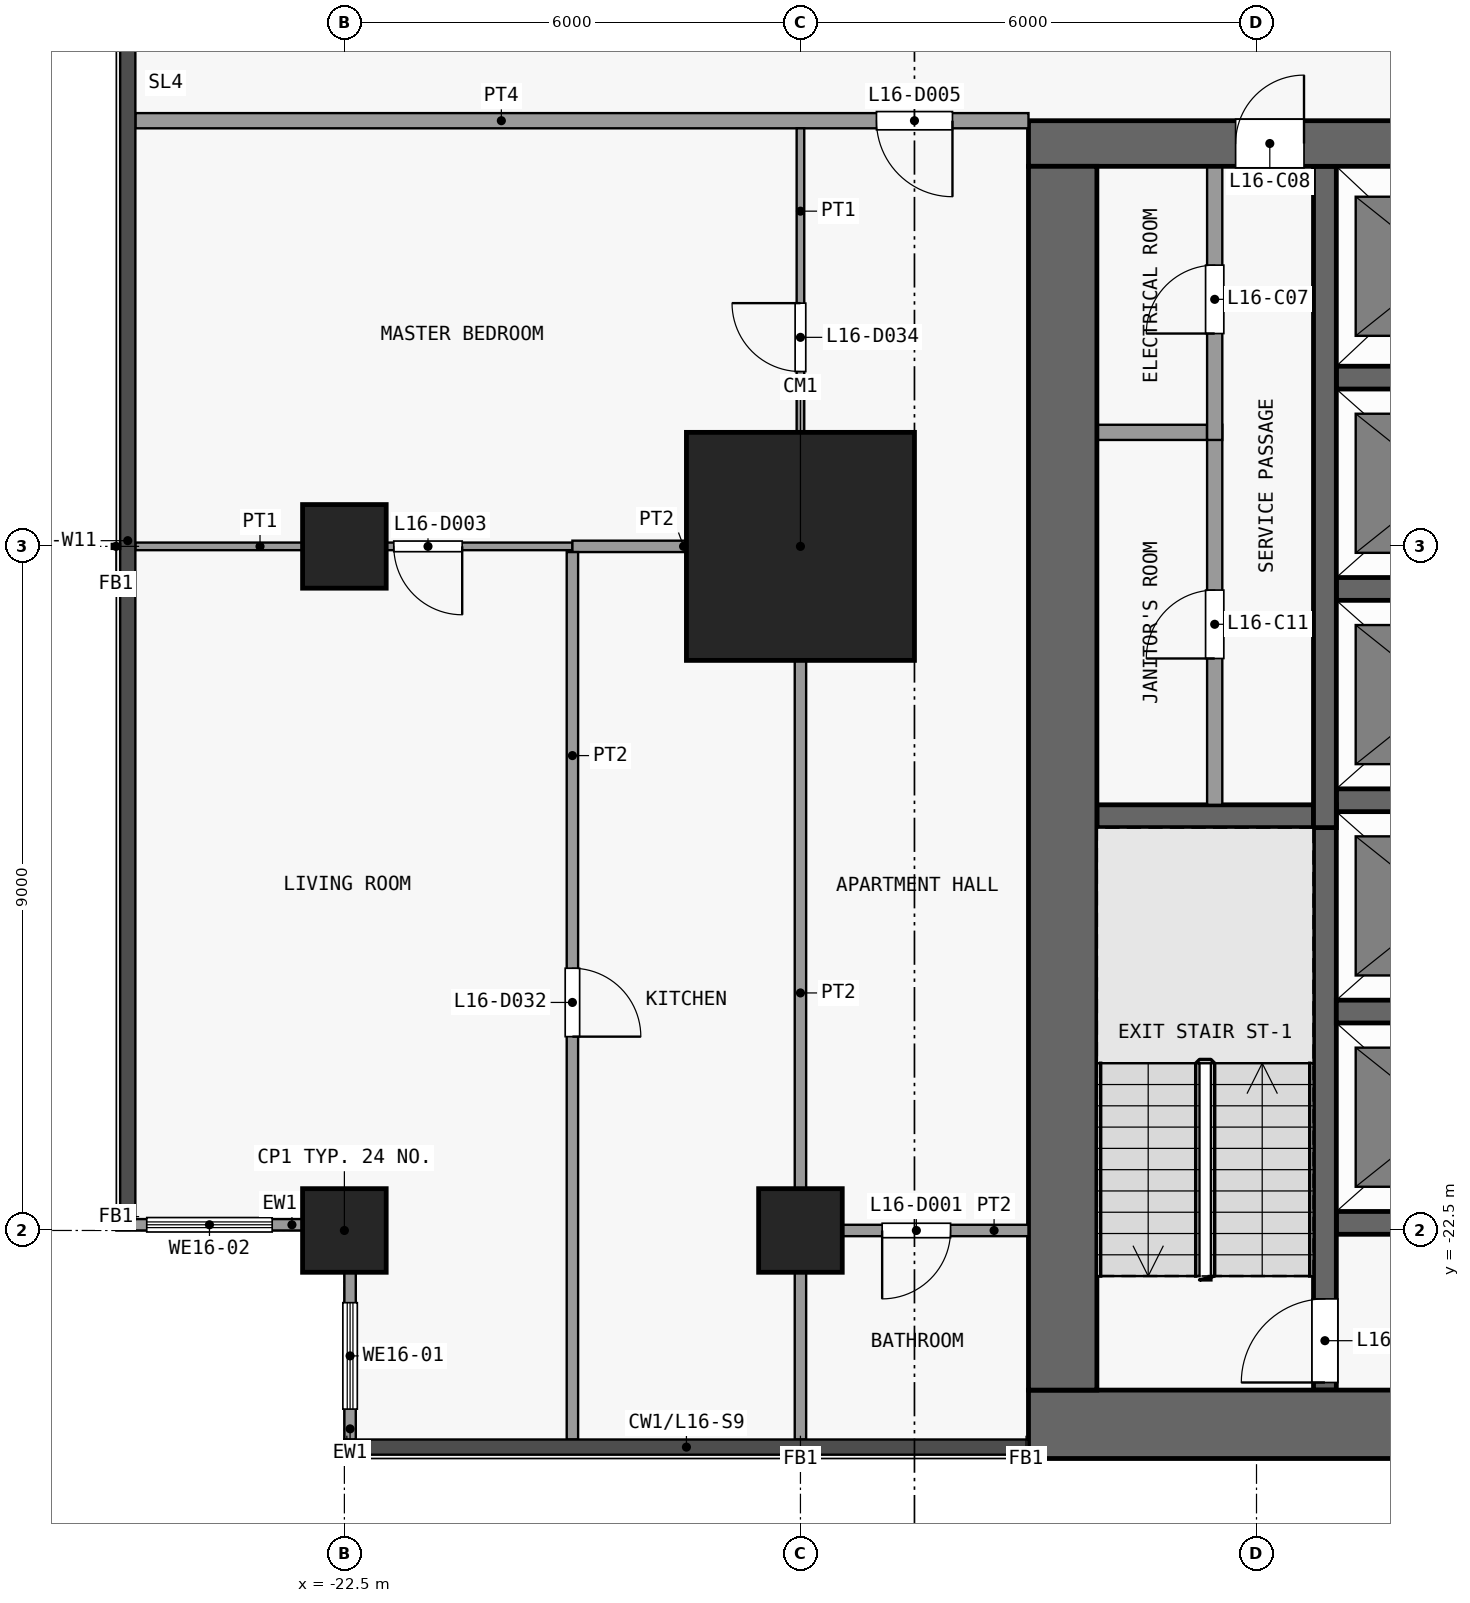
"""IFC4 building model, lengths in metres.
Left out: names, types, materials, properties, quantities, classifications, styles, units other than length and angle.
Written with IfcOpenShell. Run it as: python <this file> out.ifc"""

import sys

from ifc_helpers import new_model, si_unit, direction, frame, frame_2d, origin, origin_2d, place, context, subcontext, project, spatial, rectangle, extrude, element, fill, save


model = new_model("IFC4")
c1 = context("Model", 3, precision=1e-05, world=origin(), true_north=direction((0.0, 1.0)))
c2 = subcontext(c1, "Body", "Model", "MODEL_VIEW")
j1 = project(units=[si_unit("LENGTHUNIT", "METRE"), si_unit("PLANEANGLEUNIT", "RADIAN")], contexts=[c1])
p1 = place(None, origin())
s1 = spatial("IfcSite", under=j1, at=p1, CompositionType="ELEMENT")
p2 = place(p1, origin())
s2 = spatial("IfcBuilding", under=s1, at=p2, CompositionType="ELEMENT")
p3 = place(p2, frame((0.0, 0.0, 68.5)))
s3 = spatial("IfcBuildingStorey", under=s2, at=p3, CompositionType="ELEMENT", Elevation=68.5)
for number, where, z_axis, x_axis in (
    (1, (-22.5, -22.5, 0.0), (0.0, 0.0, 1.0), (1.0, 0.0, 0.0)),
    (2, (-22.5, -13.5, 0.0), (0.0, 0.0, 1.0), (1.0, 0.0, 0.0)),
    (3, (-16.5, -22.5, 0.0), (0.0, 0.0, 1.0), (1.0, 0.0, 0.0)),
):
    element("IfcColumn", number, at=place(p3, frame(where, z_axis=z_axis, x_axis=x_axis)), inside=s3, PredefinedType="COLUMN", context=c2, shape_type="SweptSolid", body=[
        extrude(rectangle(XDim=1.1, YDim=1.1, at=origin_2d()), origin(), (0.0, 0.0, 1.0), 3.6),
    ])
p4 = place(p3, frame((-16.5, -13.5, 0.0), z_axis=(0.0, 0.0, 1.0), x_axis=(1.0, 0.0, 0.0)))
e4 = element("IfcColumn", 4, at=p4, inside=s3, PredefinedType="COLUMN", context=c2, shape_type="SweptSolid", body=[
    extrude(rectangle(XDim=3.0, YDim=3.0, at=origin_2d()), origin(), (0.0, 0.0, 1.0), 3.6),
])
p5 = place(p3, frame((-13.5, -25.05, 0.0), z_axis=(0.0, 0.0, 1.0), x_axis=(1.0, 0.0, 0.0)))
e5 = element("IfcWall", 5, at=p5, inside=s3, PredefinedType="SHEAR", context=c2, shape_type="SweptSolid", body=[
    extrude(rectangle(XDim=27.0, YDim=0.9, at=frame_2d((13.5, 0.0))), origin(), (0.0, 0.0, 1.0), 3.3),
])
p6 = place(p3, frame((-13.5, -8.2, 0.0), z_axis=(0.0, 0.0, 1.0), x_axis=(1.0, 0.0, 0.0)))
e6 = element("IfcWall", 6, at=p6, inside=s3, PredefinedType="SHEAR", context=c2, shape_type="SweptSolid", body=[
    extrude(rectangle(XDim=27.0, YDim=0.6, at=frame_2d((13.5, 0.0))), origin(), (0.0, 0.0, 1.0), 3.3),
])
p7 = place(p6, frame((7.8, 0.0, 0.0)))
e7 = element("IfcOpeningElement", 7, at=p7, cuts=e6, PredefinedType="OPENING", context=c2, shape_type="SweptSolid", body=[
    extrude(rectangle(XDim=1.8, YDim=2.1, at=frame_2d((0.9, 1.05))), frame((0.0, 0.31, 0.0), z_axis=(0.0, -1.0, 0.0), x_axis=(1.0, 0.0, 0.0)), (0.0, 0.0, 1.0), 0.62),
])
p8 = place(p6, frame((17.4, 0.0, 0.0)))
e8 = element("IfcOpeningElement", 8, at=p8, cuts=e6, PredefinedType="OPENING", context=c2, shape_type="SweptSolid", body=[
    extrude(rectangle(XDim=1.8, YDim=2.1, at=frame_2d((0.9, 1.05))), frame((0.0, 0.31, 0.0), z_axis=(0.0, -1.0, 0.0), x_axis=(1.0, 0.0, 0.0)), (0.0, 0.0, 1.0), 0.62),
])
p9 = place(p6, frame((2.725, 0.0, 0.0)))
e9 = element("IfcOpeningElement", 9, at=p9, cuts=e6, PredefinedType="OPENING", context=c2, shape_type="SweptSolid", body=[
    extrude(rectangle(XDim=0.9, YDim=2.1, at=frame_2d((0.45, 1.05))), frame((0.0, 0.31, 0.0), z_axis=(0.0, -1.0, 0.0), x_axis=(1.0, 0.0, 0.0)), (0.0, 0.0, 1.0), 0.62),
])
p10 = place(p6, frame((24.075, 0.0, 0.0)))
e10 = element("IfcOpeningElement", 10, at=p10, cuts=e6, PredefinedType="OPENING", context=c2, shape_type="SweptSolid", body=[
    extrude(rectangle(XDim=1.2, YDim=2.1, at=frame_2d((0.6, 1.05))), frame((0.0, 0.31, 0.0), z_axis=(0.0, -1.0, 0.0), x_axis=(1.0, 0.0, 0.0)), (0.0, 0.0, 1.0), 0.62),
])
p11 = place(p3, frame((-13.05, -24.6, 0.0), z_axis=(0.0, 0.0, 1.0), x_axis=(0.0, 1.0, 0.0)))
e11 = element("IfcWall", 11, at=p11, inside=s3, PredefinedType="SHEAR", context=c2, shape_type="SweptSolid", body=[
    extrude(rectangle(XDim=16.1, YDim=0.9, at=frame_2d((8.05, 0.0))), origin(), (0.0, 0.0, 1.0), 3.3),
])
for number, where, z_axis, x_axis in (
    (12, (-9.45, -22.4, 0.0), (0.0, 0.0, 1.0), (1.0, 0.0, 0.0)),
    (13, (-9.45, -19.62, 0.0), (0.0, 0.0, 1.0), (1.0, 0.0, 0.0)),
):
    element("IfcWall", number, at=place(p3, frame(where, z_axis=z_axis, x_axis=x_axis)), inside=s3, PredefinedType="SHEAR", context=c2, shape_type="SweptSolid", body=[
        extrude(rectangle(XDim=2.8, YDim=0.3, at=frame_2d((1.4, 0.0))), origin(), (0.0, 0.0, 1.0), 3.3),
    ])
p12 = place(p3, frame((-12.6, -17.05, 0.0), z_axis=(0.0, 0.0, 1.0), x_axis=(1.0, 0.0, 0.0)))
e14 = element("IfcWall", 14, at=p12, inside=s3, PredefinedType="SHEAR", context=c2, shape_type="SweptSolid", body=[
    extrude(rectangle(XDim=2.85, YDim=0.3, at=frame_2d((1.425, 0.0))), origin(), (0.0, 0.0, 1.0), 3.3),
])
for number, where, z_axis, x_axis in (
    (15, (-9.45, -16.84, 0.0), (0.0, 0.0, 1.0), (1.0, 0.0, 0.0)),
    (16, (-9.45, -14.06, 0.0), (0.0, 0.0, 1.0), (1.0, 0.0, 0.0)),
):
    element("IfcWall", number, at=place(p3, frame(where, z_axis=z_axis, x_axis=x_axis)), inside=s3, PredefinedType="SHEAR", context=c2, shape_type="SweptSolid", body=[
        extrude(rectangle(XDim=2.8, YDim=0.3, at=frame_2d((1.4, 0.0))), origin(), (0.0, 0.0, 1.0), 3.3),
    ])
p13 = place(p3, frame((-12.6, -12.0, 0.0), z_axis=(0.0, 0.0, 1.0), x_axis=(1.0, 0.0, 0.0)))
e17 = element("IfcWall", 17, at=p13, inside=s3, PredefinedType="PARTITIONING", context=c2, shape_type="SweptSolid", body=[
    extrude(rectangle(XDim=1.45, YDim=0.2, at=frame_2d((0.725, 0.0))), origin(), (0.0, 0.0, 1.0), 3.3),
])
p14 = place(p3, frame((-9.45, -11.28, 0.0), z_axis=(0.0, 0.0, 1.0), x_axis=(1.0, 0.0, 0.0)))
e18 = element("IfcWall", 18, at=p14, inside=s3, PredefinedType="SHEAR", context=c2, shape_type="SweptSolid", body=[
    extrude(rectangle(XDim=2.8, YDim=0.3, at=frame_2d((1.4, 0.0))), origin(), (0.0, 0.0, 1.0), 3.3),
])
p15 = place(p3, frame((-11.05, -16.9, 0.0), z_axis=(0.0, 0.0, 1.0), x_axis=(0.0, 1.0, 0.0)))
e19 = element("IfcWall", 19, at=p15, inside=s3, PredefinedType="PARTITIONING", context=c2, shape_type="SweptSolid", body=[
    extrude(rectangle(XDim=5.0, YDim=0.2, at=frame_2d((2.5, 0.0))), origin(), (0.0, 0.0, 1.0), 3.3),
])
p16 = place(p15, frame((1.925, 0.0, 0.0)))
e20 = element("IfcOpeningElement", 20, at=p16, cuts=e19, PredefinedType="OPENING", context=c2, shape_type="SweptSolid", body=[
    extrude(rectangle(XDim=0.9, YDim=2.1, at=frame_2d((0.45, 1.05))), frame((0.0, 0.11, 0.0), z_axis=(0.0, -1.0, 0.0), x_axis=(1.0, 0.0, 0.0)), (0.0, 0.0, 1.0), 0.22),
])
p17 = place(p3, frame((-11.05, -12.1, 0.0), z_axis=(0.0, 0.0, 1.0), x_axis=(0.0, 1.0, 0.0)))
e21 = element("IfcWall", 21, at=p17, inside=s3, PredefinedType="PARTITIONING", context=c2, shape_type="SweptSolid", body=[
    extrude(rectangle(XDim=3.6, YDim=0.2, at=frame_2d((1.8, 0.0))), origin(), (0.0, 0.0, 1.0), 3.3),
])
p18 = place(p17, frame((1.4, 0.0, 0.0)))
e22 = element("IfcOpeningElement", 22, at=p18, cuts=e21, PredefinedType="OPENING", context=c2, shape_type="SweptSolid", body=[
    extrude(rectangle(XDim=0.9, YDim=2.1, at=frame_2d((0.45, 1.05))), frame((0.0, 0.11, 0.0), z_axis=(0.0, -1.0, 0.0), x_axis=(1.0, 0.0, 0.0)), (0.0, 0.0, 1.0), 0.22),
])
p19 = place(p3, frame((-9.6, -24.6, 0.0), z_axis=(0.0, 0.0, 1.0), x_axis=(0.0, 1.0, 0.0)))
e23 = element("IfcWall", 23, at=p19, inside=s3, PredefinedType="SHEAR", context=c2, shape_type="SweptSolid", body=[
    extrude(rectangle(XDim=7.7, YDim=0.3, at=frame_2d((3.85, 0.0))), origin(), (0.0, 0.0, 1.0), 3.3),
])
p20 = place(p19, frame((0.1, 0.0, 0.0)))
e24 = element("IfcOpeningElement", 24, at=p20, cuts=e23, PredefinedType="OPENING", context=c2, shape_type="SweptSolid", body=[
    extrude(rectangle(XDim=1.1, YDim=2.1, at=frame_2d((0.55, 1.05))), frame((0.0, 0.16, 0.0), z_axis=(0.0, -1.0, 0.0), x_axis=(1.0, 0.0, 0.0)), (0.0, 0.0, 1.0), 0.32),
])
p21 = place(p3, frame((-9.6, -17.2, 0.0), z_axis=(0.0, 0.0, 1.0), x_axis=(0.0, 1.0, 0.0)))
e25 = element("IfcWall", 25, at=p21, inside=s3, PredefinedType="SHEAR", context=c2, shape_type="SweptSolid", body=[
    extrude(rectangle(XDim=8.7, YDim=0.3, at=frame_2d((4.35, 0.0))), origin(), (0.0, 0.0, 1.0), 3.3),
])
p22 = place(p3, frame((-22.425, -25.25, 0.0), z_axis=(0.0, 0.0, 1.0), x_axis=(0.0, 1.0, 0.0)))
e26 = element("IfcWall", 26, at=p22, inside=s3, PredefinedType="SOLIDWALL", context=c2, shape_type="SweptSolid", body=[
    extrude(rectangle(XDim=2.2, YDim=0.15, at=frame_2d((1.1, 0.0))), origin(), (0.0, 0.0, 1.0), 3.3),
])
p23 = place(p22, frame((0.4, 0.0, 0.9)))
e27 = element("IfcOpeningElement", 27, at=p23, cuts=e26, PredefinedType="OPENING", context=c2, shape_type="SweptSolid", body=[
    extrude(rectangle(XDim=1.4, YDim=2.4, at=frame_2d((0.7, 1.2))), frame((0.0, 0.085, 0.0), z_axis=(0.0, -1.0, 0.0), x_axis=(1.0, 0.0, 0.0)), (0.0, 0.0, 1.0), 0.17),
])
p24 = place(p3, frame((-23.05, -22.425, 0.0), z_axis=(0.0, 0.0, 1.0), x_axis=(-1.0, 0.0, 0.0)))
e28 = element("IfcWall", 28, at=p24, inside=s3, PredefinedType="SOLIDWALL", context=c2, shape_type="SweptSolid", body=[
    extrude(rectangle(XDim=2.45, YDim=0.15, at=frame_2d((1.225, 0.0))), origin(), (0.0, 0.0, 1.0), 3.3),
])
p25 = place(p24, frame((0.4, 0.0, 0.9)))
e29 = element("IfcOpeningElement", 29, at=p25, cuts=e28, PredefinedType="OPENING", context=c2, shape_type="SweptSolid", body=[
    extrude(rectangle(XDim=1.65, YDim=2.4, at=frame_2d((0.825, 1.2))), frame((0.0, 0.085, 0.0), z_axis=(0.0, -1.0, 0.0), x_axis=(1.0, 0.0, 0.0)), (0.0, 0.0, 1.0), 0.17),
])
p26 = place(p3, frame((-16.425, -22.5, 0.0), z_axis=(0.0, 0.0, 1.0), x_axis=(1.0, 0.0, 0.0)))
e30 = element("IfcWall", 30, at=p26, inside=s3, PredefinedType="PARTITIONING", context=c2, shape_type="SweptSolid", body=[
    extrude(rectangle(XDim=2.925, YDim=0.15, at=frame_2d((1.462, 0.0))), origin(), (0.0, 0.0, 1.0), 3.3),
])
p27 = place(p26, frame((1.0, 0.0, 0.0)))
e31 = element("IfcOpeningElement", 31, at=p27, cuts=e30, PredefinedType="OPENING", context=c2, shape_type="SweptSolid", body=[
    extrude(rectangle(XDim=0.9, YDim=2.1, at=frame_2d((0.45, 1.05))), frame((0.0, 0.085, 0.0), z_axis=(0.0, -1.0, 0.0), x_axis=(1.0, 0.0, 0.0)), (0.0, 0.0, 1.0), 0.17),
])
p28 = place(p3, frame((-25.25, -13.5, 0.0), z_axis=(0.0, 0.0, 1.0), x_axis=(1.0, 0.0, 0.0)))
e32 = element("IfcWall", 32, at=p28, inside=s3, PredefinedType="PARTITIONING", context=c2, shape_type="SweptSolid", body=[
    extrude(rectangle(XDim=5.75, YDim=0.1, at=frame_2d((2.875, 0.0))), origin(), (0.0, 0.0, 1.0), 3.3),
])
p29 = place(p28, frame((3.4, 0.0, 0.0)))
e33 = element("IfcOpeningElement", 33, at=p29, cuts=e32, PredefinedType="OPENING", context=c2, shape_type="SweptSolid", body=[
    extrude(rectangle(XDim=0.9, YDim=2.1, at=frame_2d((0.45, 1.05))), frame((0.0, 0.06, 0.0), z_axis=(0.0, -1.0, 0.0), x_axis=(1.0, 0.0, 0.0)), (0.0, 0.0, 1.0), 0.12),
])
p30 = place(p3, frame((-19.5, -13.5, 0.0), z_axis=(0.0, 0.0, 1.0), x_axis=(1.0, 0.0, 0.0)))
e34 = element("IfcWall", 34, at=p30, inside=s3, PredefinedType="PARTITIONING", context=c2, shape_type="SweptSolid", body=[
    extrude(rectangle(XDim=2.925, YDim=0.15, at=frame_2d((1.462, 0.0))), origin(), (0.0, 0.0, 1.0), 3.3),
])
p31 = place(p3, frame((-25.25, -7.9, 0.0), z_axis=(0.0, 0.0, 1.0), x_axis=(1.0, 0.0, 0.0)))
e35 = element("IfcWall", 35, at=p31, inside=s3, PredefinedType="PARTITIONING", context=c2, shape_type="SweptSolid", body=[
    extrude(rectangle(XDim=11.75, YDim=0.2, at=frame_2d((5.875, 0.0))), origin(), (0.0, 0.0, 1.0), 3.3),
])
p32 = place(p31, frame((9.75, 0.0, 0.0)))
e36 = element("IfcOpeningElement", 36, at=p32, cuts=e35, PredefinedType="OPENING", context=c2, shape_type="SweptSolid", body=[
    extrude(rectangle(XDim=1.0, YDim=2.1, at=frame_2d((0.5, 1.05))), frame((0.0, 0.11, 0.0), z_axis=(0.0, -1.0, 0.0), x_axis=(1.0, 0.0, 0.0)), (0.0, 0.0, 1.0), 0.22),
])
p33 = place(p3, frame((-19.5, -25.25, 0.0), z_axis=(0.0, 0.0, 1.0), x_axis=(0.0, 1.0, 0.0)))
e37 = element("IfcWall", 37, at=p33, inside=s3, PredefinedType="PARTITIONING", context=c2, shape_type="SweptSolid", body=[
    extrude(rectangle(XDim=11.675, YDim=0.15, at=frame_2d((5.837, 0.0))), origin(), (0.0, 0.0, 1.0), 3.3),
])
p34 = place(p33, frame((5.3, 0.0, 0.0)))
e38 = element("IfcOpeningElement", 38, at=p34, cuts=e37, PredefinedType="OPENING", context=c2, shape_type="SweptSolid", body=[
    extrude(rectangle(XDim=0.9, YDim=2.1, at=frame_2d((0.45, 1.05))), frame((0.0, 0.085, 0.0), z_axis=(0.0, -1.0, 0.0), x_axis=(1.0, 0.0, 0.0)), (0.0, 0.0, 1.0), 0.17),
])
p35 = place(p3, frame((-16.5, -13.5, 0.0), z_axis=(0.0, 0.0, 1.0), x_axis=(0.0, 1.0, 0.0)))
e39 = element("IfcWall", 39, at=p35, inside=s3, PredefinedType="PARTITIONING", context=c2, shape_type="SweptSolid", body=[
    extrude(rectangle(XDim=5.5, YDim=0.1, at=frame_2d((2.75, 0.0))), origin(), (0.0, 0.0, 1.0), 3.3),
])
p36 = place(p35, frame((2.3, 0.0, 0.0)))
e40 = element("IfcOpeningElement", 40, at=p36, cuts=e39, PredefinedType="OPENING", context=c2, shape_type="SweptSolid", body=[
    extrude(rectangle(XDim=0.9, YDim=2.1, at=frame_2d((0.45, 1.05))), frame((0.0, 0.06, 0.0), z_axis=(0.0, -1.0, 0.0), x_axis=(1.0, 0.0, 0.0)), (0.0, 0.0, 1.0), 0.12),
])
p37 = place(p3, frame((-16.5, -25.25, 0.0), z_axis=(0.0, 0.0, 1.0), x_axis=(0.0, 1.0, 0.0)))
e41 = element("IfcWall", 41, at=p37, inside=s3, PredefinedType="PARTITIONING", context=c2, shape_type="SweptSolid", body=[
    extrude(rectangle(XDim=11.75, YDim=0.15, at=frame_2d((5.875, 0.0))), origin(), (0.0, 0.0, 1.0), 3.3),
])
p38 = place(p18, origin())
e42 = element("IfcDoor", 42, at=p38, inside=s3, OperationType="SINGLE_SWING_LEFT", PredefinedType="DOOR", context=c2, shape_type="SweptSolid", body=[
    extrude(rectangle(XDim=0.9, YDim=2.1, at=frame_2d((0.45, 1.05))), frame((0.0, 0.025, 0.0), z_axis=(0.0, -1.0, 0.0), x_axis=(1.0, 0.0, 0.0)), (0.0, 0.0, 1.0), 0.05),
])
fill(e22, e42)
p39 = place(p9, origin())
e43 = element("IfcDoor", 43, at=p39, inside=s3, OperationType="SINGLE_SWING_RIGHT", PredefinedType="DOOR", context=c2, shape_type="SweptSolid", body=[
    extrude(rectangle(XDim=0.9, YDim=2.1, at=frame_2d((0.45, 1.05))), frame((0.0, 0.025, 0.0), z_axis=(0.0, -1.0, 0.0), x_axis=(1.0, 0.0, 0.0)), (0.0, 0.0, 1.0), 0.05),
])
fill(e9, e43)
p40 = place(p16, origin())
e44 = element("IfcDoor", 44, at=p40, inside=s3, OperationType="SINGLE_SWING_LEFT", PredefinedType="DOOR", context=c2, shape_type="SweptSolid", body=[
    extrude(rectangle(XDim=0.9, YDim=2.1, at=frame_2d((0.45, 1.05))), frame((0.0, 0.025, 0.0), z_axis=(0.0, -1.0, 0.0), x_axis=(1.0, 0.0, 0.0)), (0.0, 0.0, 1.0), 0.05),
])
fill(e20, e44)
p41 = place(p20, origin())
e45 = element("IfcDoor", 45, at=p41, inside=s3, OperationType="SINGLE_SWING_LEFT", PredefinedType="DOOR", context=c2, shape_type="SweptSolid", body=[
    extrude(rectangle(XDim=1.1, YDim=2.1, at=frame_2d((0.55, 1.05))), frame((0.0, 0.025, 0.0), z_axis=(0.0, -1.0, 0.0), x_axis=(1.0, 0.0, 0.0)), (0.0, 0.0, 1.0), 0.05),
])
fill(e24, e45)
p42 = place(p23, origin())
e46 = element("IfcWindow", 46, at=p42, inside=s3, PartitioningType="SINGLE_PANEL", PredefinedType="WINDOW", context=c2, shape_type="SweptSolid", body=[
    extrude(rectangle(XDim=1.4, YDim=2.4, at=frame_2d((0.7, 1.2))), frame((0.0, 0.03, 0.0), z_axis=(0.0, -1.0, 0.0), x_axis=(1.0, 0.0, 0.0)), (0.0, 0.0, 1.0), 0.06),
])
fill(e27, e46)
p43 = place(p25, origin())
e47 = element("IfcWindow", 47, at=p43, inside=s3, PartitioningType="SINGLE_PANEL", PredefinedType="WINDOW", context=c2, shape_type="SweptSolid", body=[
    extrude(rectangle(XDim=1.65, YDim=2.4, at=frame_2d((0.825, 1.2))), frame((0.0, 0.03, 0.0), z_axis=(0.0, -1.0, 0.0), x_axis=(1.0, 0.0, 0.0)), (0.0, 0.0, 1.0), 0.06),
])
fill(e29, e47)
p44 = place(p27, origin())
e48 = element("IfcDoor", 48, at=p44, inside=s3, OperationType="SINGLE_SWING_LEFT", PredefinedType="DOOR", context=c2, shape_type="SweptSolid", body=[
    extrude(rectangle(XDim=0.9, YDim=2.1, at=frame_2d((0.45, 1.05))), frame((0.0, 0.025, 0.0), z_axis=(0.0, -1.0, 0.0), x_axis=(1.0, 0.0, 0.0)), (0.0, 0.0, 1.0), 0.05),
])
fill(e31, e48)
p45 = place(p29, origin())
e49 = element("IfcDoor", 49, at=p45, inside=s3, OperationType="SINGLE_SWING_RIGHT", PredefinedType="DOOR", context=c2, shape_type="SweptSolid", body=[
    extrude(rectangle(XDim=0.9, YDim=2.1, at=frame_2d((0.45, 1.05))), frame((0.0, 0.025, 0.0), z_axis=(0.0, -1.0, 0.0), x_axis=(1.0, 0.0, 0.0)), (0.0, 0.0, 1.0), 0.05),
])
fill(e33, e49)
p46 = place(p32, origin())
e50 = element("IfcDoor", 50, at=p46, inside=s3, OperationType="SINGLE_SWING_RIGHT", PredefinedType="DOOR", context=c2, shape_type="SweptSolid", body=[
    extrude(rectangle(XDim=1.0, YDim=2.1, at=frame_2d((0.5, 1.05))), frame((0.0, 0.025, 0.0), z_axis=(0.0, -1.0, 0.0), x_axis=(1.0, 0.0, 0.0)), (0.0, 0.0, 1.0), 0.05),
])
fill(e36, e50)
p47 = place(p34, origin())
e51 = element("IfcDoor", 51, at=p47, inside=s3, OperationType="SINGLE_SWING_LEFT", PredefinedType="DOOR", context=c2, shape_type="SweptSolid", body=[
    extrude(rectangle(XDim=0.9, YDim=2.1, at=frame_2d((0.45, 1.05))), frame((0.0, 0.025, 0.0), z_axis=(0.0, -1.0, 0.0), x_axis=(1.0, 0.0, 0.0)), (0.0, 0.0, 1.0), 0.05),
])
fill(e38, e51)
p48 = place(p36, origin())
e52 = element("IfcDoor", 52, at=p48, inside=s3, OperationType="SINGLE_SWING_LEFT", PredefinedType="DOOR", context=c2, shape_type="SweptSolid", body=[
    extrude(rectangle(XDim=0.9, YDim=2.1, at=frame_2d((0.45, 1.05))), frame((0.0, 0.025, 0.0), z_axis=(0.0, -1.0, 0.0), x_axis=(1.0, 0.0, 0.0)), (0.0, 0.0, 1.0), 0.05),
])
fill(e40, e52)
save(model, sys.argv[1])
